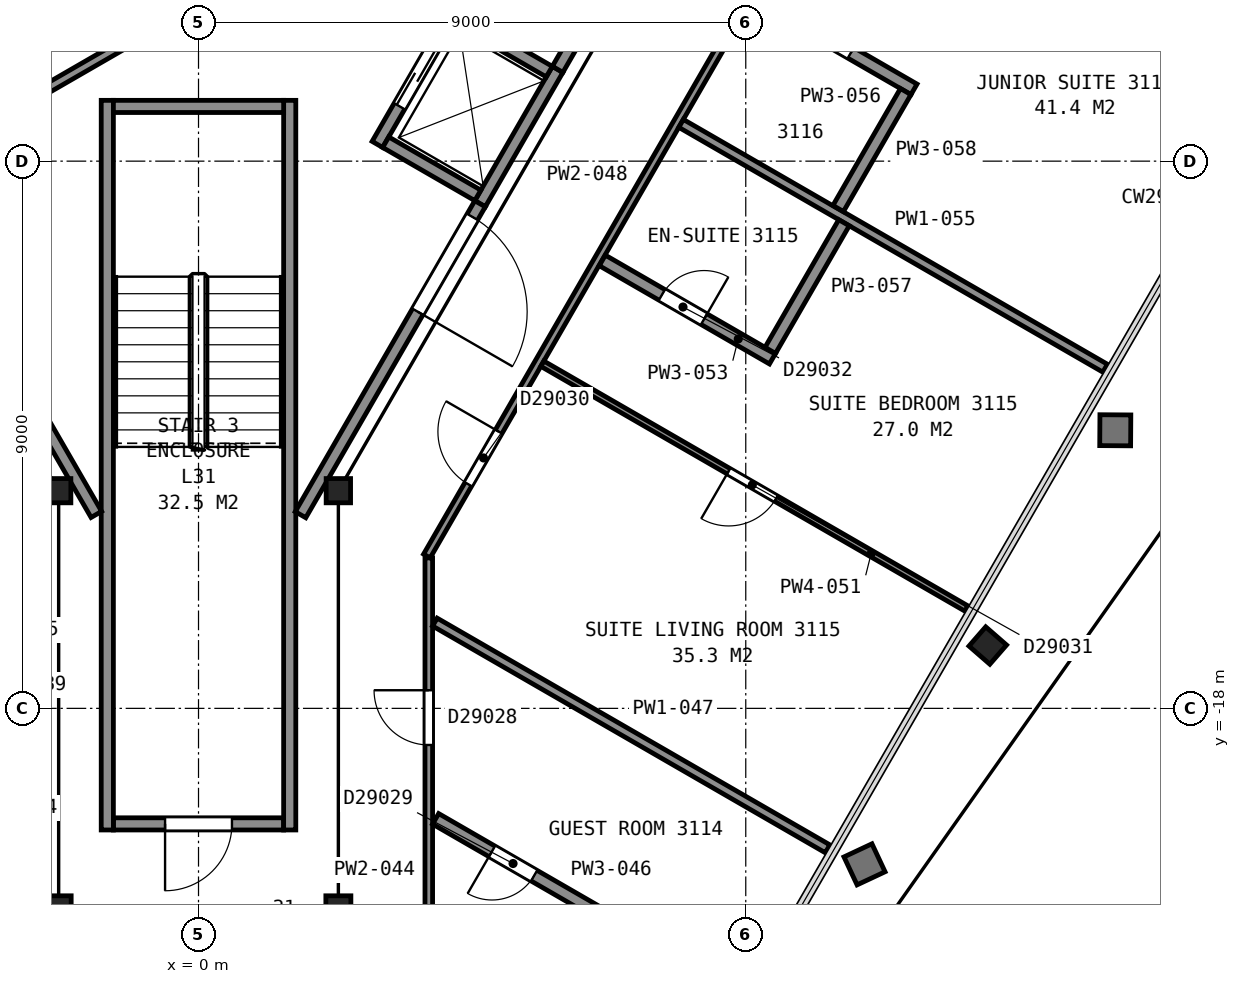
"""IFC4 building model, lengths in metres.
Left out: names, types, materials, properties, quantities, classifications, styles, units other than length and angle.
Written with IfcOpenShell. Run it as: python <this file> out.ifc"""

import sys

from ifc_helpers import new_model, si_unit, direction, frame, frame_2d, origin, origin_2d, place, context, subcontext, project, spatial, rectangle, i_section, extrude, element, fill, save


model = new_model("IFC4")
c1 = context("Model", 3, precision=1e-05, world=origin(), true_north=direction((0.0, 1.0)))
c2 = subcontext(c1, "Body", "Model", "MODEL_VIEW")
j1 = project(units=[si_unit("LENGTHUNIT", "METRE"), si_unit("PLANEANGLEUNIT", "RADIAN")], contexts=[c1])
p1 = place(None, origin())
s1 = spatial("IfcSite", under=j1, at=p1, CompositionType="ELEMENT")
p2 = place(p1, origin())
s2 = spatial("IfcBuilding", under=s1, at=p2, CompositionType="ELEMENT")
p3 = place(p2, frame((0.0, 0.0, 128.8)))
s3 = spatial("IfcBuildingStorey", under=s2, at=p3, CompositionType="ELEMENT", Elevation=128.8)
p4 = place(p3, frame((12.806, -16.815, 0.04), z_axis=(0.147138437405, -0.128091390491, 0.980786865695), x_axis=(-0.499727465286, -0.865346759384, -0.038045321162)))
e1 = element("IfcColumn", 1, at=p4, inside=s3, PredefinedType="COLUMN", context=c2, shape_type="SweptSolid", body=[
    extrude(i_section(OverallWidth=0.419, OverallDepth=0.455, WebThickness=0.042, FlangeThickness=0.068, FilletRadius=0.015, at=origin_2d()), origin(), (0.0, 0.0, 1.0), 3.589),
])
p5 = place(p3, frame((-2.3, -14.42, 0.0), z_axis=(0.0, 0.0, 1.0), x_axis=(1.0, 0.0, 0.0)))
e2 = element("IfcColumn", 2, at=p5, inside=s3, PredefinedType="COLUMN", context=c2, shape_type="SweptSolid", body=[
    extrude(i_section(OverallWidth=0.401, OverallDepth=0.399, WebThickness=0.025, FlangeThickness=0.04, FilletRadius=0.015, at=origin_2d()), origin(), (0.0, 0.0, 1.0), 3.6),
])
for number, where, z_axis, x_axis in (
    (3, (-2.3, -21.3, 0.0), (0.0, 0.0, 1.0), (-1.0, 0.0, 0.0)),
    (4, (2.3, -21.3, 0.0), (0.0, 0.0, 1.0), (-1.0, 0.0, 0.0)),
):
    element("IfcColumn", number, at=place(p3, frame(where, z_axis=z_axis, x_axis=x_axis)), inside=s3, PredefinedType="COLUMN", context=c2, shape_type="SweptSolid", body=[
        extrude(i_section(OverallWidth=0.411, OverallDepth=0.434, WebThickness=0.036, FlangeThickness=0.057, FilletRadius=0.015, at=origin_2d()), origin(), (0.0, 0.0, 1.0), 3.6),
    ])
p6 = place(p3, frame((2.3, -14.42, 0.0), z_axis=(0.0, 0.0, 1.0), x_axis=(1.0, 0.0, 0.0)))
e5 = element("IfcColumn", 5, at=p6, inside=s3, PredefinedType="COLUMN", context=c2, shape_type="SweptSolid", body=[
    extrude(i_section(OverallWidth=0.401, OverallDepth=0.399, WebThickness=0.025, FlangeThickness=0.04, FilletRadius=0.015, at=origin_2d()), origin(), (0.0, 0.0, 1.0), 3.6),
])
p7 = place(p3, frame((-1.4, -19.9, 0.0), z_axis=(0.0, 0.0, 1.0), x_axis=(1.0, 0.0, 0.0)))
e6 = element("IfcWall", 6, at=p7, inside=s3, PredefinedType="PARTITIONING", context=c2, shape_type="SweptSolid", body=[
    extrude(rectangle(XDim=2.8, YDim=0.2, at=frame_2d((1.4, 0.0))), origin(), (0.0, 0.0, 1.0), 3.35),
])
p8 = place(p7, frame((0.85, 0.0, 0.0)))
e7 = element("IfcOpeningElement", 7, at=p8, cuts=e6, PredefinedType="OPENING", context=c2, shape_type="SweptSolid", body=[
    extrude(rectangle(XDim=1.1, YDim=2.1, at=frame_2d((0.55, 1.05))), frame((0.0, 0.11, 0.0), z_axis=(0.0, -1.0, 0.0), x_axis=(1.0, 0.0, 0.0)), (0.0, 0.0, 1.0), 0.22),
])
for number, where, z_axis, x_axis in (
    (8, (1.5, -8.0, 0.0), (0.0, 0.0, 1.0), (0.0, -1.0, 0.0)),
    (9, (-1.5, -8.0, 0.0), (0.0, 0.0, 1.0), (0.0, -1.0, 0.0)),
):
    element("IfcWall", number, at=place(p3, frame(where, z_axis=z_axis, x_axis=x_axis)), inside=s3, PredefinedType="PARTITIONING", context=c2, shape_type="SweptSolid", body=[
        extrude(rectangle(XDim=12.0, YDim=0.2, at=frame_2d((6.0, 0.0))), origin(), (0.0, 0.0, 1.0), 3.35),
    ])
p9 = place(p3, frame((-1.4, -8.1, 0.0), z_axis=(0.0, 0.0, 1.0), x_axis=(1.0, 0.0, 0.0)))
e10 = element("IfcWall", 10, at=p9, inside=s3, PredefinedType="PARTITIONING", context=c2, shape_type="SweptSolid", body=[
    extrude(rectangle(XDim=2.8, YDim=0.2, at=frame_2d((1.4, 0.0))), origin(), (0.0, 0.0, 1.0), 3.35),
])
p10 = place(p3, frame((4.63, -9.7, 0.0), z_axis=(0.0, 0.0, 1.0), x_axis=(0.500062241894, 0.865989465428, 0.0)))
e11 = element("IfcWall", 11, at=p10, inside=s3, PredefinedType="PARTITIONING", context=c2, shape_type="SweptSolid", body=[
    extrude(rectangle(XDim=2.55, YDim=0.2, at=frame_2d((1.275, 0.0))), origin(), (0.0, 0.0, 1.0), 3.6),
])
p11 = place(p3, frame((2.942, -8.725, 0.0), z_axis=(0.0, 0.0, 1.0), x_axis=(0.500020783669, 0.866013403995, 0.0)))
e12 = element("IfcWall", 12, at=p11, inside=s3, PredefinedType="PARTITIONING", context=c2, shape_type="SweptSolid", body=[
    extrude(rectangle(XDim=2.55, YDim=0.2, at=frame_2d((1.275, 0.0))), origin(), (0.0, 0.0, 1.0), 3.6),
])
p12 = place(p11, frame((0.725, 0.0, 0.0)))
e13 = element("IfcOpeningElement", 13, at=p12, cuts=e12, PredefinedType="OPENING", context=c2, shape_type="SweptSolid", body=[
    extrude(rectangle(XDim=1.1, YDim=2.1, at=frame_2d((0.55, 1.05))), frame((0.0, 0.11, 0.0), z_axis=(0.0, -1.0, 0.0), x_axis=(1.0, 0.0, 0.0)), (0.0, 0.0, 1.0), 0.22),
])
p13 = place(p3, frame((5.769, -7.528, 0.0), z_axis=(0.0, 0.0, 1.0), x_axis=(-0.866002029911, 0.500040482552, 0.0)))
e14 = element("IfcWall", 14, at=p13, inside=s3, PredefinedType="PARTITIONING", context=c2, shape_type="SweptSolid", body=[
    extrude(rectangle(XDim=1.75, YDim=0.2, at=frame_2d((0.875, 0.0))), origin(), (0.0, 0.0, 1.0), 3.6),
])
p14 = place(p3, frame((4.594, -9.563, 0.0), z_axis=(0.0, 0.0, 1.0), x_axis=(-0.866036909293, 0.499980071345, 0.0)))
e15 = element("IfcWall", 15, at=p14, inside=s3, PredefinedType="PARTITIONING", context=c2, shape_type="SweptSolid", body=[
    extrude(rectangle(XDim=1.75, YDim=0.2, at=frame_2d((0.875, 0.0))), origin(), (0.0, 0.0, 1.0), 3.6),
])
p15 = place(p3, frame((-13.664, 5.946, 0.0), z_axis=(0.0, 0.0, 1.0), x_axis=(0.499994327219, -0.866028678941, 0.0)))
e16 = element("IfcWall", 16, at=p15, inside=s3, PredefinedType="PARTITIONING", context=c2, shape_type="SweptSolid", body=[
    extrude(rectangle(XDim=23.968, YDim=0.2, at=frame_2d((11.984, 0.0))), origin(), (0.0, 0.0, 1.0), 3.35),
])
p16 = place(p3, frame((-4.825, -9.154, 0.0), z_axis=(0.0, 0.0, 1.0), x_axis=(0.866023738697, 0.500002884005, 0.0)))
e17 = element("IfcWall", 17, at=p16, inside=s3, PredefinedType="PARTITIONING", context=c2, shape_type="SweptSolid", body=[
    extrude(rectangle(XDim=4.22, YDim=0.15, at=frame_2d((2.11, 0.0))), origin(), (0.0, 0.0, 1.0), 3.35),
])
p17 = place(p16, frame((1.595, 0.0, 0.0)))
e18 = element("IfcOpeningElement", 18, at=p17, cuts=e17, PredefinedType="OPENING", context=c2, shape_type="SweptSolid", body=[
    extrude(rectangle(XDim=0.9, YDim=2.1, at=frame_2d((0.45, 1.05))), frame((0.0, 0.085, 0.0), z_axis=(0.0, -1.0, 0.0), x_axis=(1.0, 0.0, 0.0)), (0.0, 0.0, 1.0), 0.17),
])
p18 = place(p3, frame((1.677, -14.815, 0.0), z_axis=(0.0, 0.0, 1.0), x_axis=(0.49999445743, 0.866028603765, 0.0)))
e19 = element("IfcWall", 19, at=p18, inside=s3, PredefinedType="PARTITIONING", context=c2, shape_type="SweptSolid", body=[
    extrude(rectangle(XDim=5.905, YDim=0.2, at=frame_2d((2.952, 0.0))), origin(), (0.0, 0.0, 1.0), 3.35),
])
p19 = place(p18, frame((3.855, 0.0, 0.0)))
e20 = element("IfcOpeningElement", 20, at=p19, cuts=e19, PredefinedType="OPENING", context=c2, shape_type="SweptSolid", body=[
    extrude(rectangle(XDim=1.8, YDim=2.1, at=frame_2d((0.9, 1.05))), frame((0.0, 0.11, 0.0), z_axis=(0.0, -1.0, 0.0), x_axis=(1.0, 0.0, 0.0)), (0.0, 0.0, 1.0), 0.22),
])
p20 = place(p3, frame((5.906, -7.49, 0.0), z_axis=(0.0, 0.0, 1.0), x_axis=(0.500252727967, 0.865879442048, 0.0)))
e21 = element("IfcWall", 21, at=p20, inside=s3, PredefinedType="PARTITIONING", context=c2, shape_type="SweptSolid", body=[
    extrude(rectangle(XDim=2.617, YDim=0.2, at=frame_2d((1.309, 0.0))), origin(), (0.0, 0.0, 1.0), 3.35),
])
p21 = place(p3, frame((3.787, -15.525, 0.0), z_axis=(0.0, 0.0, 1.0), x_axis=(0.0, -1.0, 0.0)))
e22 = element("IfcWall", 22, at=p21, inside=s3, PredefinedType="PARTITIONING", context=c2, shape_type="SweptSolid", body=[
    extrude(rectangle(XDim=7.197, YDim=0.125, at=frame_2d((3.599, 0.0))), origin(), (0.0, 0.0, 1.0), 2.613),
])
p22 = place(p21, frame((2.177, 0.0, 0.0)))
e23 = element("IfcOpeningElement", 23, at=p22, cuts=e22, PredefinedType="OPENING", context=c2, shape_type="SweptSolid", body=[
    extrude(rectangle(XDim=0.9, YDim=2.1, at=frame_2d((0.45, 1.05))), frame((0.0, 0.073, 0.0), z_axis=(0.0, -1.0, 0.0), x_axis=(1.0, 0.0, 0.0)), (0.0, 0.0, 1.0), 0.145),
])
p23 = place(p3, frame((6.674, -21.418, 0.0), z_axis=(0.0, 0.0, 1.0), x_axis=(-0.866105631149, 0.499861016376, 0.0)))
e24 = element("IfcWall", 24, at=p23, inside=s3, PredefinedType="PARTITIONING", context=c2, shape_type="SweptSolid", body=[
    extrude(rectangle(XDim=3.203, YDim=0.2, at=frame_2d((1.602, 0.0))), origin(), (0.0, 0.0, 1.0), 2.613),
])
p24 = place(p23, frame((1.333, 0.0, 0.0)))
e25 = element("IfcOpeningElement", 25, at=p24, cuts=e24, PredefinedType="OPENING", context=c2, shape_type="SweptSolid", body=[
    extrude(rectangle(XDim=0.8, YDim=2.1, at=frame_2d((0.4, 1.05))), frame((0.0, 0.11, 0.0), z_axis=(0.0, -1.0, 0.0), x_axis=(1.0, 0.0, 0.0)), (0.0, 0.0, 1.0), 0.22),
])
p25 = place(p3, frame((3.887, -16.581, 0.0), z_axis=(0.0, 0.0, 1.0), x_axis=(0.866008413041, -0.500029427677, 0.0)))
e26 = element("IfcWall", 26, at=p25, inside=s3, PredefinedType="PARTITIONING", context=c2, shape_type="SweptSolid", body=[
    extrude(rectangle(XDim=7.458, YDim=0.15, at=frame_2d((3.729, 0.0))), origin(), (0.0, 0.0, 1.0), 2.613),
])
p26 = place(p3, frame((15.684, 5.165, 0.0), z_axis=(0.0, 0.0, 1.0), x_axis=(-0.500027787016, -0.866009360349, 0.0)))
e27 = element("IfcWall", 27, at=p26, inside=s3, PredefinedType="PARTITIONING", context=c2, shape_type="SweptSolid", body=[
    extrude(rectangle(XDim=23.856, YDim=0.125, at=frame_2d((11.928, 0.0))), origin(), (0.0, 0.0, 1.0), 2.613),
])
p27 = place(p26, frame((21.493, 0.0, 0.0)))
e28 = element("IfcOpeningElement", 28, at=p27, cuts=e27, PredefinedType="OPENING", context=c2, shape_type="SweptSolid", body=[
    extrude(rectangle(XDim=1.0, YDim=2.1, at=frame_2d((0.5, 1.05))), frame((0.0, 0.073, 0.0), z_axis=(0.0, -1.0, 0.0), x_axis=(1.0, 0.0, 0.0)), (0.0, 0.0, 1.0), 0.145),
])
p28 = place(p26, frame((10.853, 0.0, 0.0)))
e29 = element("IfcOpeningElement", 29, at=p28, cuts=e27, PredefinedType="OPENING", context=c2, shape_type="SweptSolid", body=[
    extrude(rectangle(XDim=0.9, YDim=2.1, at=frame_2d((0.45, 1.05))), frame((0.0, 0.073, 0.0), z_axis=(0.0, -1.0, 0.0), x_axis=(1.0, 0.0, 0.0)), (0.0, 0.0, 1.0), 0.145),
])
p29 = place(p26, frame((6.558, 0.0, 0.0)))
e30 = element("IfcOpeningElement", 30, at=p29, cuts=e27, PredefinedType="OPENING", context=c2, shape_type="SweptSolid", body=[
    extrude(rectangle(XDim=1.0, YDim=2.1, at=frame_2d((0.5, 1.05))), frame((0.0, 0.073, 0.0), z_axis=(0.0, -1.0, 0.0), x_axis=(1.0, 0.0, 0.0)), (0.0, 0.0, 1.0), 0.145),
])
p30 = place(p3, frame((5.654, -12.331, 0.0), z_axis=(0.0, 0.0, 1.0), x_axis=(0.866051796338, -0.49995428397, 0.0)))
e31 = element("IfcWall", 31, at=p30, inside=s3, PredefinedType="PARTITIONING", context=c2, shape_type="SweptSolid", body=[
    extrude(rectangle(XDim=8.052, YDim=0.1, at=frame_2d((4.026, 0.0))), origin(), (0.0, 0.0, 1.0), 2.613),
])
p31 = place(p30, frame((3.538, 0.0, 0.0)))
e32 = element("IfcOpeningElement", 32, at=p31, cuts=e31, PredefinedType="OPENING", context=c2, shape_type="SweptSolid", body=[
    extrude(rectangle(XDim=0.9, YDim=2.1, at=frame_2d((0.45, 1.05))), frame((0.0, 0.06, 0.0), z_axis=(0.0, -1.0, 0.0), x_axis=(1.0, 0.0, 0.0)), (0.0, 0.0, 1.0), 0.12),
])
p32 = place(p3, frame((6.64, -10.633, 0.0), z_axis=(0.0, 0.0, 1.0), x_axis=(0.866022073929, -0.500005767435, 0.0)))
e33 = element("IfcWall", 33, at=p32, inside=s3, PredefinedType="PARTITIONING", context=c2, shape_type="SweptSolid", body=[
    extrude(rectangle(XDim=3.232, YDim=0.2, at=frame_2d((1.616, 0.0))), origin(), (0.0, 0.0, 1.0), 2.613),
])
p33 = place(p32, frame((1.133, 0.0, 0.0)))
e34 = element("IfcOpeningElement", 34, at=p33, cuts=e33, PredefinedType="OPENING", context=c2, shape_type="SweptSolid", body=[
    extrude(rectangle(XDim=0.8, YDim=2.1, at=frame_2d((0.4, 1.05))), frame((0.0, 0.11, 0.0), z_axis=(0.0, -1.0, 0.0), x_axis=(1.0, 0.0, 0.0)), (0.0, 0.0, 1.0), 0.22),
])
p34 = place(p3, frame((7.936, -8.379, 0.0), z_axis=(0.0, 0.0, 1.0), x_axis=(0.866044217767, -0.499967411811, 0.0)))
e35 = element("IfcWall", 35, at=p34, inside=s3, PredefinedType="PARTITIONING", context=c2, shape_type="SweptSolid", body=[
    extrude(rectangle(XDim=8.052, YDim=0.15, at=frame_2d((4.026, 0.0))), origin(), (0.0, 0.0, 1.0), 2.613),
])
p35 = place(p3, frame((11.767, -7.819, 0.0), z_axis=(0.0, 0.0, 1.0), x_axis=(-0.866009954834, 0.500026757412, 0.0)))
e36 = element("IfcWall", 36, at=p35, inside=s3, PredefinedType="PARTITIONING", context=c2, shape_type="SweptSolid", body=[
    extrude(rectangle(XDim=3.032, YDim=0.2, at=frame_2d((1.516, 0.0))), origin(), (0.0, 0.0, 1.0), 2.613),
])
p36 = place(p35, frame((1.2, 0.0, 0.0)))
e37 = element("IfcOpeningElement", 37, at=p36, cuts=e36, PredefinedType="OPENING", context=c2, shape_type="SweptSolid", body=[
    extrude(rectangle(XDim=0.8, YDim=2.1, at=frame_2d((0.4, 1.05))), frame((0.0, 0.11, 0.0), z_axis=(0.0, -1.0, 0.0), x_axis=(1.0, 0.0, 0.0)), (0.0, 0.0, 1.0), 0.22),
])
p37 = place(p3, frame((9.403, -12.112, 0.0), z_axis=(0.0, 0.0, 1.0), x_axis=(0.500103096288, 0.865965872932, 0.0)))
e38 = element("IfcWall", 38, at=p37, inside=s3, PredefinedType="PARTITIONING", context=c2, shape_type="SweptSolid", body=[
    extrude(rectangle(XDim=2.424, YDim=0.2, at=frame_2d((1.212, 0.0))), origin(), (0.0, 0.0, 1.0), 2.613),
])
p38 = place(p3, frame((10.52, -9.779, 0.0), z_axis=(0.0, 0.0, 1.0), x_axis=(0.499935013329, 0.866062920605, 0.0)))
e39 = element("IfcWall", 39, at=p38, inside=s3, PredefinedType="PARTITIONING", context=c2, shape_type="SweptSolid", body=[
    extrude(rectangle(XDim=2.22, YDim=0.2, at=frame_2d((1.11, 0.0))), origin(), (0.0, 0.0, 1.0), 2.613),
])
p39 = place(p8, origin())
e40 = element("IfcDoor", 40, at=p39, inside=s3, OperationType="SINGLE_SWING_LEFT", PredefinedType="DOOR", context=c2, shape_type="SweptSolid", body=[
    extrude(rectangle(XDim=1.1, YDim=2.1, at=frame_2d((0.55, 1.05))), frame((0.0, 0.025, 0.0), z_axis=(0.0, -1.0, 0.0), x_axis=(1.0, 0.0, 0.0)), (0.0, 0.0, 1.0), 0.05),
])
fill(e7, e40)
p40 = place(p12, origin())
e41 = element("IfcDoor", 41, at=p40, inside=s3, OperationType="SLIDING_TO_RIGHT", PredefinedType="DOOR", context=c2, shape_type="SweptSolid", body=[
    extrude(rectangle(XDim=1.1, YDim=2.1, at=frame_2d((0.55, 1.05))), frame((0.0, 0.025, 0.0), z_axis=(0.0, -1.0, 0.0), x_axis=(1.0, 0.0, 0.0)), (0.0, 0.0, 1.0), 0.05),
])
fill(e13, e41)
p41 = place(p19, origin())
e42 = element("IfcDoor", 42, at=p41, inside=s3, OperationType="DOUBLE_DOOR_SINGLE_SWING", PredefinedType="DOOR", context=c2, shape_type="SweptSolid", body=[
    extrude(rectangle(XDim=1.8, YDim=2.1, at=frame_2d((0.9, 1.05))), frame((0.0, 0.025, 0.0), z_axis=(0.0, -1.0, 0.0), x_axis=(1.0, 0.0, 0.0)), (0.0, 0.0, 1.0), 0.05),
])
fill(e20, e42)
p42 = place(p22, origin())
e43 = element("IfcDoor", 43, at=p42, inside=s3, OperationType="SINGLE_SWING_LEFT", PredefinedType="DOOR", context=c2, shape_type="SweptSolid", body=[
    extrude(rectangle(XDim=0.9, YDim=2.1, at=frame_2d((0.45, 1.05))), frame((0.0, 0.025, 0.0), z_axis=(0.0, -1.0, 0.0), x_axis=(1.0, 0.0, 0.0)), (0.0, 0.0, 1.0), 0.05),
])
fill(e23, e43)
p43 = place(p24, origin())
e44 = element("IfcDoor", 44, at=p43, inside=s3, OperationType="SINGLE_SWING_RIGHT", PredefinedType="DOOR", context=c2, shape_type="SweptSolid", body=[
    extrude(rectangle(XDim=0.8, YDim=2.1, at=frame_2d((0.4, 1.05))), frame((0.0, 0.025, 0.0), z_axis=(0.0, -1.0, 0.0), x_axis=(1.0, 0.0, 0.0)), (0.0, 0.0, 1.0), 0.05),
])
fill(e25, e44)
p44 = place(p27, origin())
e45 = element("IfcDoor", 45, at=p44, inside=s3, OperationType="SINGLE_SWING_LEFT", PredefinedType="DOOR", context=c2, shape_type="SweptSolid", body=[
    extrude(rectangle(XDim=1.0, YDim=2.1, at=frame_2d((0.5, 1.05))), frame((0.0, 0.025, 0.0), z_axis=(0.0, -1.0, 0.0), x_axis=(1.0, 0.0, 0.0)), (0.0, 0.0, 1.0), 0.05),
])
fill(e28, e45)
p45 = place(p31, origin())
e46 = element("IfcDoor", 46, at=p45, inside=s3, OperationType="SINGLE_SWING_LEFT", PredefinedType="DOOR", context=c2, shape_type="SweptSolid", body=[
    extrude(rectangle(XDim=0.9, YDim=2.1, at=frame_2d((0.45, 1.05))), frame((0.0, 0.025, 0.0), z_axis=(0.0, -1.0, 0.0), x_axis=(1.0, 0.0, 0.0)), (0.0, 0.0, 1.0), 0.05),
])
fill(e32, e46)
p46 = place(p33, origin())
e47 = element("IfcDoor", 47, at=p46, inside=s3, OperationType="SINGLE_SWING_RIGHT", PredefinedType="DOOR", context=c2, shape_type="SweptSolid", body=[
    extrude(rectangle(XDim=0.8, YDim=2.1, at=frame_2d((0.4, 1.05))), frame((0.0, 0.025, 0.0), z_axis=(0.0, -1.0, 0.0), x_axis=(1.0, 0.0, 0.0)), (0.0, 0.0, 1.0), 0.05),
])
fill(e34, e47)
p47 = place(p36, origin())
e48 = element("IfcDoor", 48, at=p47, inside=s3, OperationType="SINGLE_SWING_LEFT", PredefinedType="DOOR", context=c2, shape_type="SweptSolid", body=[
    extrude(rectangle(XDim=0.8, YDim=2.1, at=frame_2d((0.4, 1.05))), frame((0.0, 0.025, 0.0), z_axis=(0.0, -1.0, 0.0), x_axis=(1.0, 0.0, 0.0)), (0.0, 0.0, 1.0), 0.05),
])
fill(e37, e48)
save(model, sys.argv[1])
